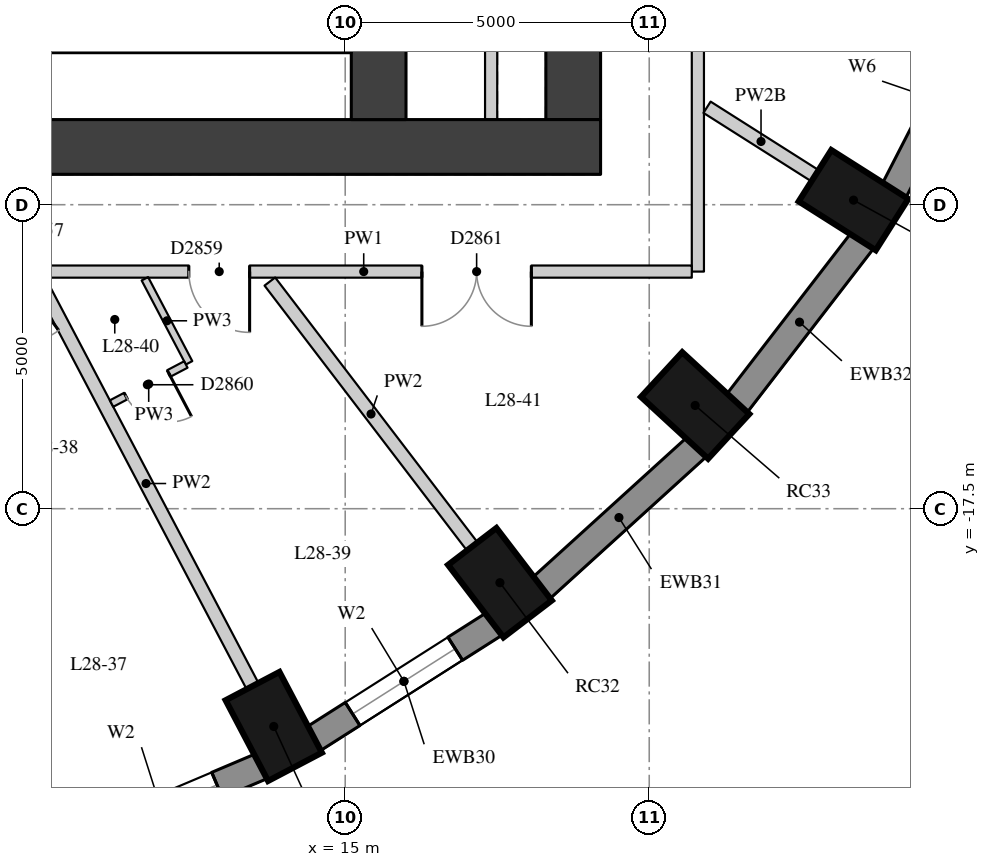
"""IFC4 building model, lengths in metres.
Left out: names, types, materials, properties, quantities, classifications, styles, units other than length and angle.
Written with IfcOpenShell. Run it as: python <this file> out.ifc"""

import sys

from ifc_helpers import new_model, si_unit, direction, frame, frame_2d, origin, origin_2d, place, context, subcontext, project, spatial, rectangle, extrude, element, fill, save


model = new_model("IFC4")
c1 = context("Model", 3, precision=1e-05, world=origin(), true_north=direction((0.0, 1.0)))
c2 = subcontext(c1, "Body", "Model", "MODEL_VIEW")
j1 = project(units=[si_unit("LENGTHUNIT", "METRE"), si_unit("PLANEANGLEUNIT", "RADIAN")], contexts=[c1])
p1 = place(None, origin())
s1 = spatial("IfcSite", under=j1, at=p1, CompositionType="ELEMENT")
p2 = place(p1, origin())
s2 = spatial("IfcBuilding", under=s1, at=p2, CompositionType="ELEMENT")
p3 = place(p2, frame((0.0, 0.0, 102.1)))
s3 = spatial("IfcBuildingStorey", under=s2, at=p3, CompositionType="ELEMENT", Elevation=102.1)
for number, where, z_axis, x_axis in (
    (1, (9.71, -22.824, 0.0), (0.0, 0.0, 1.0), (0.315, -0.949, 0.0)),
    (2, (13.825, -21.082, 0.0), (0.0, 0.0, 1.0), (0.465, -0.885, 0.0)),
    (3, (17.545, -18.717, 0.0), (0.0, 0.0, 1.0), (0.607, -0.795, 0.0)),
    (4, (20.755, -15.802, 0.0), (0.0, 0.0, 1.0), (0.735, -0.678, 0.0)),
    (5, (23.36, -12.425, 0.0), (0.0, 0.0, 1.0), (0.845, -0.536, 0.0)),
):
    element("IfcColumn", number, at=place(p3, frame(where, z_axis=z_axis, x_axis=x_axis)), inside=s3, PredefinedType="COLUMN", context=c2, shape_type="SweptSolid", body=[
        extrude(rectangle(XDim=1.5, YDim=1.0, at=origin_2d()), origin(), (0.0, 0.0, 1.0), 3.3),
    ])
p4 = place(p3, frame((10.318, -23.134, 0.0), z_axis=(0.0, 0.0, 1.0), x_axis=(0.920869643542, 0.389870619055, 0.0)))
e6 = element("IfcWall", 6, at=p4, inside=s3, PredefinedType="SOLIDWALL", context=c2, shape_type="SweptSolid", body=[
    extrude(rectangle(XDim=3.591, YDim=0.45, at=frame_2d((1.796, 0.0))), origin(), (0.0, 0.0, 1.0), 3.02),
])
p5 = place(p4, frame((0.796, 0.0, 0.4)))
e7 = element("IfcOpeningElement", 7, at=p5, cuts=e6, PredefinedType="OPENING", context=c2, shape_type="SweptSolid", body=[
    extrude(rectangle(XDim=2.0, YDim=1.75, at=frame_2d((1.0, 0.875))), frame((0.0, 0.235, 0.0), z_axis=(0.0, -1.0, 0.0), x_axis=(1.0, 0.0, 0.0)), (0.0, 0.0, 1.0), 0.47),
])
p6 = place(p3, frame((14.475, -21.287, 0.0), z_axis=(0.0, 0.0, 1.0), x_axis=(0.843911841423, 0.536481876587, 0.0)))
e8 = element("IfcWall", 8, at=p6, inside=s3, PredefinedType="SOLIDWALL", context=c2, shape_type="SweptSolid", body=[
    extrude(rectangle(XDim=3.532, YDim=0.45, at=frame_2d((1.766, 0.0))), origin(), (0.0, 0.0, 1.0), 3.02),
])
p7 = place(p6, frame((0.766, 0.0, 0.4)))
e9 = element("IfcOpeningElement", 9, at=p7, cuts=e8, PredefinedType="OPENING", context=c2, shape_type="SweptSolid", body=[
    extrude(rectangle(XDim=2.0, YDim=1.75, at=frame_2d((1.0, 0.875))), frame((0.0, 0.235, 0.0), z_axis=(0.0, -1.0, 0.0), x_axis=(1.0, 0.0, 0.0)), (0.0, 0.0, 1.0), 0.47),
])
p8 = place(p3, frame((18.219, -18.81, 0.0), z_axis=(0.0, 0.0, 1.0), x_axis=(0.740364106106, 0.672206062446, 0.0)))
e10 = element("IfcWall", 10, at=p8, inside=s3, PredefinedType="SOLIDWALL", context=c2, shape_type="SweptSolid", body=[
    extrude(rectangle(XDim=3.464, YDim=0.45, at=frame_2d((1.732, 0.0))), origin(), (0.0, 0.0, 1.0), 3.02),
])
p9 = place(p3, frame((21.435, -15.775, 0.0), z_axis=(0.0, 0.0, 1.0), x_axis=(0.610693945156, 0.791866721961, 0.0)))
e11 = element("IfcWall", 11, at=p9, inside=s3, PredefinedType="SOLIDWALL", context=c2, shape_type="SweptSolid", body=[
    extrude(rectangle(XDim=3.395, YDim=0.45, at=frame_2d((1.697, 0.0))), origin(), (0.0, 0.0, 1.0), 3.02),
])
p10 = place(p3, frame((24.023, -12.277, 0.0), z_axis=(0.0, 0.0, 1.0), x_axis=(0.456828186229, 0.889554949549, 0.0)))
e12 = element("IfcWall", 12, at=p10, inside=s3, PredefinedType="SOLIDWALL", context=c2, shape_type="SweptSolid", body=[
    extrude(rectangle(XDim=3.333, YDim=0.45, at=frame_2d((1.667, 0.0))), origin(), (0.0, 0.0, 1.0), 3.02),
])
p11 = place(p10, frame((1.366, 0.0, 0.4)))
e13 = element("IfcOpeningElement", 13, at=p11, cuts=e12, PredefinedType="OPENING", context=c2, shape_type="SweptSolid", body=[
    extrude(rectangle(XDim=0.6, YDim=1.75, at=frame_2d((0.3, 0.875))), frame((0.0, 0.235, 0.0), z_axis=(0.0, -1.0, 0.0), x_axis=(1.0, 0.0, 0.0)), (0.0, 0.0, 1.0), 0.47),
])
p12 = place(p3, frame((18.75, -11.1, 0.0), z_axis=(0.0, 0.0, 1.0), x_axis=(0.0, 1.0, 0.0)))
e14 = element("IfcWall", 14, at=p12, inside=s3, PredefinedType="SHEAR", context=c2, shape_type="SweptSolid", body=[
    extrude(rectangle(XDim=22.2, YDim=0.9, at=frame_2d((11.1, 0.0))), origin(), (0.0, 0.0, 1.0), 3.02),
])
p13 = place(p12, frame((15.675, 0.0, 0.0)))
e15 = element("IfcOpeningElement", 15, at=p13, cuts=e14, PredefinedType="OPENING", context=c2, shape_type="SweptSolid", body=[
    extrude(rectangle(XDim=1.5, YDim=2.1, at=frame_2d((0.75, 1.05))), frame((0.0, 0.46, 0.0), z_axis=(0.0, -1.0, 0.0), x_axis=(1.0, 0.0, 0.0)), (0.0, 0.0, 1.0), 0.92),
])
p14 = place(p12, frame((4.775, 0.0, 0.0)))
e16 = element("IfcOpeningElement", 16, at=p14, cuts=e14, PredefinedType="OPENING", context=c2, shape_type="SweptSolid", body=[
    extrude(rectangle(XDim=1.5, YDim=2.1, at=frame_2d((0.75, 1.05))), frame((0.0, 0.46, 0.0), z_axis=(0.0, -1.0, 0.0), x_axis=(1.0, 0.0, 0.0)), (0.0, 0.0, 1.0), 0.92),
])
p15 = place(p3, frame((4.0, -11.55, 0.0), z_axis=(0.0, 0.0, 1.0), x_axis=(1.0, 0.0, 0.0)))
e17 = element("IfcWall", 17, at=p15, inside=s3, PredefinedType="SHEAR", context=c2, shape_type="SweptSolid", body=[
    extrude(rectangle(XDim=15.2, YDim=0.9, at=frame_2d((7.6, 0.0))), origin(), (0.0, 0.0, 1.0), 3.02),
])
p16 = place(p3, frame((15.55, -11.1, 0.0), z_axis=(0.0, 0.0, 1.0), x_axis=(0.0, 1.0, 0.0)))
e18 = element("IfcWall", 18, at=p16, inside=s3, PredefinedType="SHEAR", context=c2, shape_type="SweptSolid", body=[
    extrude(rectangle(XDim=22.2, YDim=0.9, at=frame_2d((11.1, 0.0))), origin(), (0.0, 0.0, 1.0), 3.02),
])
p17 = place(p16, frame((15.6, 0.0, 0.0)))
e19 = element("IfcOpeningElement", 19, at=p17, cuts=e18, PredefinedType="OPENING", context=c2, shape_type="SweptSolid", body=[
    extrude(rectangle(XDim=1.0, YDim=2.1, at=frame_2d((0.5, 1.05))), frame((0.0, 0.46, 0.0), z_axis=(0.0, -1.0, 0.0), x_axis=(1.0, 0.0, 0.0)), (0.0, 0.0, 1.0), 0.92),
])
p18 = place(p16, frame((5.6, 0.0, 0.0)))
e20 = element("IfcOpeningElement", 20, at=p18, cuts=e18, PredefinedType="OPENING", context=c2, shape_type="SweptSolid", body=[
    extrude(rectangle(XDim=1.0, YDim=2.1, at=frame_2d((0.5, 1.05))), frame((0.0, 0.46, 0.0), z_axis=(0.0, -1.0, 0.0), x_axis=(1.0, 0.0, 0.0)), (0.0, 0.0, 1.0), 0.92),
])
p19 = place(p3, frame((4.9, -9.55, 0.0), z_axis=(0.0, 0.0, 1.0), x_axis=(1.0, 0.0, 0.0)))
e21 = element("IfcWall", 21, at=p19, inside=s3, PredefinedType="SHEAR", context=c2, shape_type="SweptSolid", body=[
    extrude(rectangle(XDim=10.2, YDim=0.9, at=frame_2d((5.1, 0.0))), origin(), (0.0, 0.0, 1.0), 3.02),
])
p20 = place(p3, frame((17.4, -11.1, 0.0), z_axis=(0.0, 0.0, 1.0), x_axis=(0.0, 1.0, 0.0)))
e22 = element("IfcWall", 22, at=p20, inside=s3, PredefinedType="PARTITIONING", context=c2, shape_type="SweptSolid", body=[
    extrude(rectangle(XDim=4.2, YDim=0.2, at=frame_2d((2.1, 0.0))), origin(), (0.0, 0.0, 1.0), 3.02),
])
p21 = place(p3, frame((20.8, 13.5, 0.0), z_axis=(0.0, 0.0, 1.0), x_axis=(0.0, -1.0, 0.0)))
e23 = element("IfcWall", 23, at=p21, inside=s3, PredefinedType="PARTITIONING", context=c2, shape_type="SweptSolid", body=[
    extrude(rectangle(XDim=27.1, YDim=0.2, at=frame_2d((13.55, 0.0))), origin(), (0.0, 0.0, 1.0), 3.02),
])
p22 = place(p21, frame((18.404, 0.0, 0.0)))
e24 = element("IfcOpeningElement", 24, at=p22, cuts=e23, PredefinedType="OPENING", context=c2, shape_type="SweptSolid", body=[
    extrude(rectangle(XDim=1.8, YDim=2.1, at=frame_2d((0.9, 1.05))), frame((0.0, 0.11, 0.0), z_axis=(0.0, -1.0, 0.0), x_axis=(1.0, 0.0, 0.0)), (0.0, 0.0, 1.0), 0.22),
])
p23 = place(p21, frame((7.996, 0.0, 0.0)))
e25 = element("IfcOpeningElement", 25, at=p23, cuts=e23, PredefinedType="OPENING", context=c2, shape_type="SweptSolid", body=[
    extrude(rectangle(XDim=1.8, YDim=2.1, at=frame_2d((0.9, 1.05))), frame((0.0, 0.11, 0.0), z_axis=(0.0, -1.0, 0.0), x_axis=(1.0, 0.0, 0.0)), (0.0, 0.0, 1.0), 0.22),
])
p24 = place(p21, frame((1.055, 0.0, 0.0)))
e26 = element("IfcOpeningElement", 26, at=p24, cuts=e23, PredefinedType="OPENING", context=c2, shape_type="SweptSolid", body=[
    extrude(rectangle(XDim=1.8, YDim=2.1, at=frame_2d((0.9, 1.05))), frame((0.0, 0.11, 0.0), z_axis=(0.0, -1.0, 0.0), x_axis=(1.0, 0.0, 0.0)), (0.0, 0.0, 1.0), 0.22),
])
p25 = place(p3, frame((20.7, -13.6, 0.0), z_axis=(0.0, 0.0, 1.0), x_axis=(-1.0, 0.0, 0.0)))
e27 = element("IfcWall", 27, at=p25, inside=s3, PredefinedType="PARTITIONING", context=c2, shape_type="SweptSolid", body=[
    extrude(rectangle(XDim=10.791, YDim=0.2, at=frame_2d((5.396, 0.0))), origin(), (0.0, 0.0, 1.0), 3.02),
])
p26 = place(p25, frame((7.272, 0.0, 0.0)))
e28 = element("IfcOpeningElement", 28, at=p26, cuts=e27, PredefinedType="OPENING", context=c2, shape_type="SweptSolid", body=[
    extrude(rectangle(XDim=1.0, YDim=2.1, at=frame_2d((0.5, 1.05))), frame((0.0, 0.11, 0.0), z_axis=(0.0, -1.0, 0.0), x_axis=(1.0, 0.0, 0.0)), (0.0, 0.0, 1.0), 0.22),
])
p27 = place(p25, frame((2.638, 0.0, 0.0)))
e29 = element("IfcOpeningElement", 29, at=p27, cuts=e27, PredefinedType="OPENING", context=c2, shape_type="SweptSolid", body=[
    extrude(rectangle(XDim=1.8, YDim=2.1, at=frame_2d((0.9, 1.05))), frame((0.0, 0.11, 0.0), z_axis=(0.0, -1.0, 0.0), x_axis=(1.0, 0.0, 0.0)), (0.0, 0.0, 1.0), 0.22),
])
p28 = place(p3, frame((13.476, -20.418, 0.0), z_axis=(0.0, 0.0, 1.0), x_axis=(-0.465332071749, 0.885136183308, 0.0)))
e30 = element("IfcWall", 30, at=p28, inside=s3, PredefinedType="PARTITIONING", context=c2, shape_type="SweptSolid", body=[
    extrude(rectangle(XDim=7.529, YDim=0.22, at=frame_2d((3.764, 0.0))), origin(), (0.0, 0.0, 1.0), 3.02),
])
p29 = place(p3, frame((17.089, -18.121, 0.0), z_axis=(0.0, 0.0, 1.0), x_axis=(-0.607064955951, 0.794652212767, 0.0)))
e31 = element("IfcWall", 31, at=p29, inside=s3, PredefinedType="PARTITIONING", context=c2, shape_type="SweptSolid", body=[
    extrude(rectangle(XDim=5.483, YDim=0.22, at=frame_2d((2.742, 0.0))), origin(), (0.0, 0.0, 1.0), 3.02),
])
p30 = place(p3, frame((22.727, -12.023, 0.0), z_axis=(0.0, 0.0, 1.0), x_axis=(-0.844497052188, 0.535560200954, 0.0)))
e32 = element("IfcWall", 32, at=p30, inside=s3, PredefinedType="PARTITIONING", context=c2, shape_type="SweptSolid", body=[
    extrude(rectangle(XDim=2.103, YDim=0.22, at=frame_2d((1.051, 0.0))), origin(), (0.0, 0.0, 1.0), 2.57),
])
p31 = place(p3, frame((11.705, -13.718, 0.0), z_axis=(0.0, 0.0, 1.0), x_axis=(0.465437210927, -0.885080901773, 0.0)))
e33 = element("IfcWall", 33, at=p31, inside=s3, PredefinedType="PARTITIONING", context=c2, shape_type="SweptSolid", body=[
    extrude(rectangle(XDim=1.562, YDim=0.12, at=frame_2d((0.781, 0.0))), origin(), (0.0, 0.0, 1.0), 3.02),
])
p32 = place(p3, frame((12.379, -15.128, 0.0), z_axis=(0.0, 0.0, 1.0), x_axis=(-0.885113826366, -0.465374595757, 0.0)))
e34 = element("IfcWall", 34, at=p32, inside=s3, PredefinedType="PARTITIONING", context=c2, shape_type="SweptSolid", body=[
    extrude(rectangle(XDim=1.38, YDim=0.12, at=frame_2d((0.69, 0.0))), origin(), (0.0, 0.0, 1.0), 3.02),
])
p33 = place(p32, frame((0.315, 0.0, 0.0)))
e35 = element("IfcOpeningElement", 35, at=p33, cuts=e34, PredefinedType="OPENING", context=c2, shape_type="SweptSolid", body=[
    extrude(rectangle(XDim=0.8, YDim=2.1, at=frame_2d((0.4, 1.05))), frame((0.0, 0.07, 0.0), z_axis=(0.0, -1.0, 0.0), x_axis=(1.0, 0.0, 0.0)), (0.0, 0.0, 1.0), 0.14),
])
p34 = place(p5, origin())
e36 = element("IfcWindow", 36, at=p34, inside=s3, PartitioningType="SINGLE_PANEL", PredefinedType="WINDOW", context=c2, shape_type="SweptSolid", body=[
    extrude(rectangle(XDim=2.0, YDim=1.75, at=frame_2d((1.0, 0.875))), frame((0.0, 0.035, 0.0), z_axis=(0.0, -1.0, 0.0), x_axis=(1.0, 0.0, 0.0)), (0.0, 0.0, 1.0), 0.06),
])
fill(e7, e36)
p35 = place(p7, origin())
e37 = element("IfcWindow", 37, at=p35, inside=s3, PartitioningType="SINGLE_PANEL", PredefinedType="WINDOW", context=c2, shape_type="SweptSolid", body=[
    extrude(rectangle(XDim=2.0, YDim=1.75, at=frame_2d((1.0, 0.875))), frame((0.0, 0.035, 0.0), z_axis=(0.0, -1.0, 0.0), x_axis=(1.0, 0.0, 0.0)), (0.0, 0.0, 1.0), 0.06),
])
fill(e9, e37)
p36 = place(p26, origin())
e38 = element("IfcDoor", 38, at=p36, inside=s3, OperationType="SINGLE_SWING_LEFT", PredefinedType="DOOR", context=c2, shape_type="SweptSolid", body=[
    extrude(rectangle(XDim=1.0, YDim=2.1, at=frame_2d((0.5, 1.05))), frame((0.0, 0.025, 0.0), z_axis=(0.0, -1.0, 0.0), x_axis=(1.0, 0.0, 0.0)), (0.0, 0.0, 1.0), 0.05),
])
fill(e28, e38)
p37 = place(p33, origin())
e39 = element("IfcDoor", 39, at=p37, inside=s3, OperationType="SINGLE_SWING_LEFT", PredefinedType="DOOR", context=c2, shape_type="SweptSolid", body=[
    extrude(rectangle(XDim=0.8, YDim=2.1, at=frame_2d((0.4, 1.05))), frame((0.0, 0.025, 0.0), z_axis=(0.0, -1.0, 0.0), x_axis=(1.0, 0.0, 0.0)), (0.0, 0.0, 1.0), 0.05),
])
fill(e35, e39)
p38 = place(p27, origin())
e40 = element("IfcDoor", 40, at=p38, inside=s3, OperationType="DOUBLE_DOOR_SINGLE_SWING", PredefinedType="DOOR", context=c2, shape_type="SweptSolid", body=[
    extrude(rectangle(XDim=1.8, YDim=2.1, at=frame_2d((0.9, 1.05))), frame((0.0, 0.025, 0.0), z_axis=(0.0, -1.0, 0.0), x_axis=(1.0, 0.0, 0.0)), (0.0, 0.0, 1.0), 0.05),
])
fill(e29, e40)
save(model, sys.argv[1])
